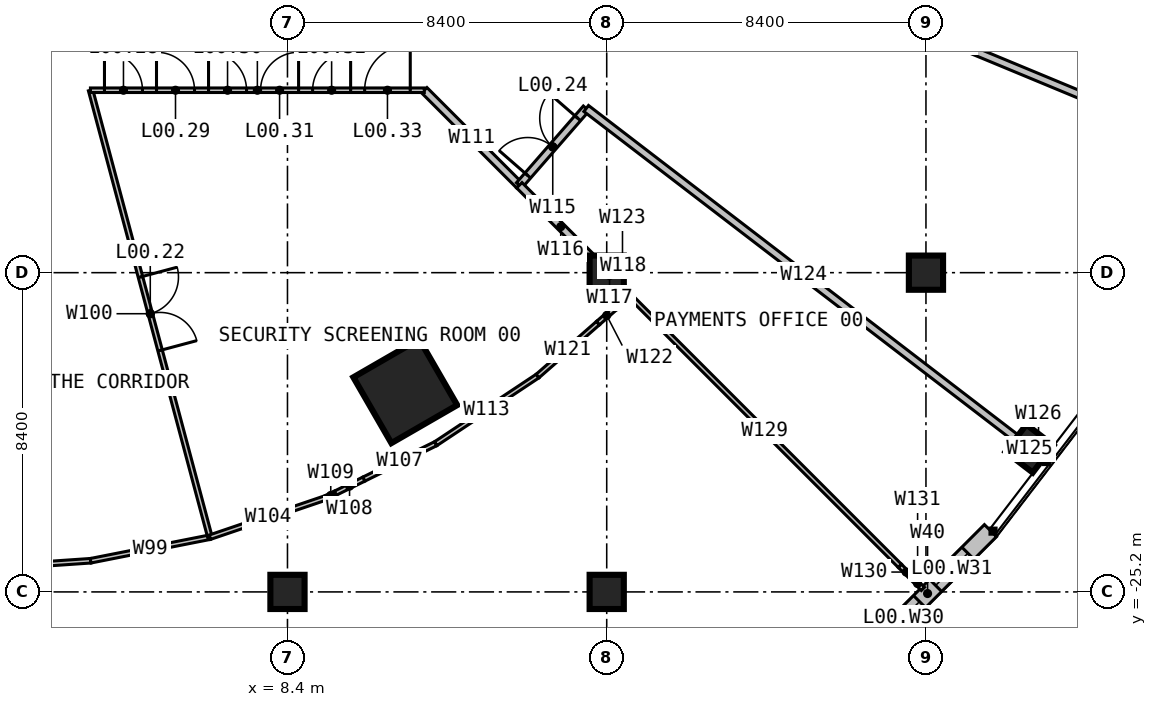
"""IFC4 building model, lengths in metres.
Left out: names, types, materials, properties, quantities, classifications, styles, units other than length and angle.
Written with IfcOpenShell. Run it as: python <this file> out.ifc"""

import sys

from ifc_helpers import new_model, si_unit, direction, frame, frame_2d, origin, origin_2d, place, context, subcontext, project, spatial, rectangle, hollow_rectangle, extrude, element, fill, save


model = new_model("IFC4")
c1 = context("Model", 3, precision=1e-05, world=origin(), true_north=direction((0.0, 1.0)))
c2 = subcontext(c1, "Body", "Model", "MODEL_VIEW")
j1 = project(units=[si_unit("LENGTHUNIT", "METRE"), si_unit("PLANEANGLEUNIT", "RADIAN")], contexts=[c1])
p1 = place(None, origin())
s1 = spatial("IfcSite", under=j1, at=p1, CompositionType="ELEMENT")
p2 = place(p1, origin())
s2 = spatial("IfcBuilding", under=s1, at=p2, CompositionType="ELEMENT")
p3 = place(p2, origin())
s3 = spatial("IfcBuildingStorey", under=s2, at=p3, CompositionType="ELEMENT", Elevation=0.0)
for number, where, z_axis, x_axis in (
    (1, (8.4, -25.2, 0.0), (0.0, 0.0, 1.0), (1.0, 0.0, 0.0)),
    (2, (16.8, -25.2, 0.0), (0.0, 0.0, 1.0), (1.0, 0.0, 0.0)),
    (3, (16.8, -16.8, 0.0), (0.0, 0.0, 1.0), (1.0, 0.0, 0.0)),
    (4, (25.2, -16.8, 0.0), (0.0, 0.0, 1.0), (1.0, 0.0, 0.0)),
    (5, (27.926, -21.428, 0.0), (0.0, 0.0, 1.0), (0.793, -0.609, 0.0)),
):
    element("IfcColumn", number, at=place(p3, frame(where, z_axis=z_axis, x_axis=x_axis)), inside=s3, PredefinedType="COLUMN", context=c2, shape_type="SweptSolid", body=[
        extrude(rectangle(XDim=0.9, YDim=0.9, at=origin_2d()), origin(), (0.0, 0.0, 1.0), 6.0),
    ])
p4 = place(p3, frame((11.5, -19.919, 0.0), z_axis=(0.0, 0.0, 1.0), x_axis=(0.5, -0.866025403784, 0.0)))
e6 = element("IfcColumn", 6, at=p4, inside=s3, PredefinedType="COLUMN", context=c2, shape_type="SweptSolid", body=[
    extrude(hollow_rectangle(XDim=2.0, YDim=2.0, WallThickness=0.24, at=origin_2d()), origin(), (0.0, 0.0, 1.0), 6.0),
])
p5 = place(p3, frame((23.588, -26.897, 0.0), z_axis=(0.0, 0.0, 1.0), x_axis=(0.707106781187, 0.707106781187, 0.0)))
e7 = element("IfcWall", 7, at=p5, inside=s3, PredefinedType="SOLIDWALL", context=c2, shape_type="SweptSolid", body=[
    extrude(rectangle(XDim=4.679, YDim=0.45, at=frame_2d((2.34, 0.0))), origin(), (0.0, 0.0, 1.0), 5.7),
])
p6 = place(p5, frame((0.84, 0.0, 0.9)))
e8 = element("IfcOpeningElement", 8, at=p6, cuts=e7, PredefinedType="OPENING", context=c2, shape_type="SweptSolid", body=[
    extrude(rectangle(XDim=1.2, YDim=3.6, at=frame_2d((0.6, 1.8))), frame((0.0, 0.235, 0.0), z_axis=(0.0, -1.0, 0.0), x_axis=(1.0, 0.0, 0.0)), (0.0, 0.0, 1.0), 0.47),
])
p7 = place(p5, frame((2.64, 0.0, 0.9)))
e9 = element("IfcOpeningElement", 9, at=p7, cuts=e7, PredefinedType="OPENING", context=c2, shape_type="SweptSolid", body=[
    extrude(rectangle(XDim=1.2, YDim=3.6, at=frame_2d((0.6, 1.8))), frame((0.0, 0.235, 0.0), z_axis=(0.0, -1.0, 0.0), x_axis=(1.0, 0.0, 0.0)), (0.0, 0.0, 1.0), 0.47),
])
p8 = place(p3, frame((0.166, -24.589, 0.0), z_axis=(0.0, 0.0, 1.0), x_axis=(0.997672608774, 0.068186257434, 0.0)))
e10 = element("IfcWall", 10, at=p8, inside=s3, PredefinedType="PARTITIONING", context=c2, shape_type="SweptSolid", body=[
    extrude(rectangle(XDim=3.061, YDim=0.12, at=frame_2d((1.531, 0.0))), origin(), (0.0, 0.0, 1.0), 5.7),
])
p9 = place(p3, frame((3.22, -24.38, 0.0), z_axis=(0.0, 0.0, 1.0), x_axis=(0.98106754531, 0.193665876033, 0.0)))
e11 = element("IfcWall", 11, at=p9, inside=s3, PredefinedType="PARTITIONING", context=c2, shape_type="SweptSolid", body=[
    extrude(rectangle(XDim=3.201, YDim=0.12, at=frame_2d((1.6, 0.0))), origin(), (0.0, 0.0, 1.0), 5.7),
])
p10 = place(p3, frame((3.22, -12.0, 0.0), z_axis=(0.0, 0.0, 1.0), x_axis=(0.257979728484, -0.966150329758, 0.0)))
e12 = element("IfcWall", 12, at=p10, inside=s3, PredefinedType="PARTITIONING", context=c2, shape_type="SweptSolid", body=[
    extrude(rectangle(XDim=12.172, YDim=0.12, at=frame_2d((6.086, 0.0))), origin(), (0.0, 0.0, 1.0), 5.7),
])
p11 = place(p10, frame((5.086, 0.0, 0.0)))
e13 = element("IfcOpeningElement", 13, at=p11, cuts=e12, PredefinedType="OPENING", context=c2, shape_type="SweptSolid", body=[
    extrude(rectangle(XDim=2.0, YDim=2.4, at=frame_2d((1.0, 1.2))), frame((0.0, 0.07, 0.0), z_axis=(0.0, -1.0, 0.0), x_axis=(1.0, 0.0, 0.0)), (0.0, 0.0, 1.0), 0.14),
])
p12 = place(p3, frame((6.36, -23.76, 0.0), z_axis=(0.0, 0.0, 1.0), x_axis=(0.946800830057, 0.321820117773, 0.0)))
e14 = element("IfcWall", 14, at=p12, inside=s3, PredefinedType="PARTITIONING", context=c2, shape_type="SweptSolid", body=[
    extrude(rectangle(XDim=3.232, YDim=0.12, at=frame_2d((1.616, 0.0))), origin(), (0.0, 0.0, 1.0), 5.7),
])
p13 = place(p3, frame((10.408, -22.233, 0.0), z_axis=(0.0, 0.0, 1.0), x_axis=(0.896913641042, 0.442205744551, 0.0)))
e15 = element("IfcWall", 15, at=p13, inside=s3, PredefinedType="PARTITIONING", context=c2, shape_type="SweptSolid", body=[
    extrude(rectangle(XDim=2.109, YDim=0.12, at=frame_2d((1.055, 0.0))), origin(), (0.0, 0.0, 1.0), 5.7),
])
p14 = place(p3, frame((9.658, -22.603, 0.0), z_axis=(0.0, 0.0, 1.0), x_axis=(0.896921584296, 0.442189633103, 0.0)))
e16 = element("IfcWall", 16, at=p14, inside=s3, PredefinedType="PARTITIONING", context=c2, shape_type="SweptSolid", body=[
    extrude(rectangle(XDim=0.837, YDim=0.12, at=frame_2d((0.418, 0.0))), origin(), (0.0, 0.0, 1.0), 5.3),
])
p15 = place(p3, frame((9.42, -22.72, 0.0), z_axis=(0.0, 0.0, 1.0), x_axis=(0.896990941369, 0.442048923878, 0.0)))
e17 = element("IfcWall", 17, at=p15, inside=s3, PredefinedType="PARTITIONING", context=c2, shape_type="SweptSolid", body=[
    extrude(rectangle(XDim=0.265, YDim=0.12, at=frame_2d((0.133, 0.0))), origin(), (0.0, 0.0, 1.0), 5.7),
])
p16 = place(p3, frame((12.0, -12.0, 0.0), z_axis=(0.0, 0.0, 1.0), x_axis=(0.707106781187, -0.707106781187, 0.0)))
e18 = element("IfcWall", 18, at=p16, inside=s3, PredefinedType="PARTITIONING", context=c2, shape_type="SweptSolid", body=[
    extrude(rectangle(XDim=3.536, YDim=0.2, at=frame_2d((1.768, 0.0))), origin(), (0.0, 0.0, 1.0), 5.7),
])
p17 = place(p3, frame((12.3, -21.3, 0.0), z_axis=(0.0, 0.0, 1.0), x_axis=(0.832994734858, 0.553280915719, 0.0)))
e19 = element("IfcWall", 19, at=p17, inside=s3, PredefinedType="PARTITIONING", context=c2, shape_type="SweptSolid", body=[
    extrude(rectangle(XDim=3.217, YDim=0.12, at=frame_2d((1.609, 0.0))), origin(), (0.0, 0.0, 1.0), 5.7),
])
p18 = place(p3, frame((14.5, -14.5, 0.0), z_axis=(0.0, 0.0, 1.0), x_axis=(0.656916126811, 0.753963661151, 0.0)))
e20 = element("IfcWall", 20, at=p18, inside=s3, PredefinedType="PARTITIONING", context=c2, shape_type="SweptSolid", body=[
    extrude(rectangle(XDim=2.679, YDim=0.2, at=frame_2d((1.34, 0.0))), origin(), (0.0, 0.0, 1.0), 5.7),
])
p19 = place(p18, frame((0.34, 0.0, 0.0)))
e21 = element("IfcOpeningElement", 21, at=p19, cuts=e20, PredefinedType="OPENING", context=c2, shape_type="SweptSolid", body=[
    extrude(rectangle(XDim=2.0, YDim=2.4, at=frame_2d((1.0, 1.2))), frame((0.0, 0.11, 0.0), z_axis=(0.0, -1.0, 0.0), x_axis=(1.0, 0.0, 0.0)), (0.0, 0.0, 1.0), 0.22),
])
p20 = place(p3, frame((14.5, -14.5, 0.0), z_axis=(0.0, 0.0, 1.0), x_axis=(0.707106781187, -0.707106781187, 0.0)))
e22 = element("IfcWall", 22, at=p20, inside=s3, PredefinedType="PARTITIONING", context=c2, shape_type="SweptSolid", body=[
    extrude(rectangle(XDim=3.083, YDim=0.2, at=frame_2d((1.542, 0.0))), origin(), (0.0, 0.0, 1.0), 5.7),
])
p21 = place(p3, frame((16.68, -16.68, 0.0), z_axis=(0.0, 0.0, 1.0), x_axis=(0.707106781187, -0.707106781187, 0.0)))
e23 = element("IfcWall", 23, at=p21, inside=s3, PredefinedType="PARTITIONING", context=c2, shape_type="SweptSolid", body=[
    extrude(rectangle(XDim=0.552, YDim=0.2, at=frame_2d((0.276, 0.0))), origin(), (0.0, 0.0, 1.0), 5.3),
])
p22 = place(p3, frame((17.07, -17.07, 0.0), z_axis=(0.0, 0.0, 1.0), x_axis=(0.707106781187, -0.707106781187, 0.0)))
e24 = element("IfcWall", 24, at=p22, inside=s3, PredefinedType="PARTITIONING", context=c2, shape_type="SweptSolid", body=[
    extrude(rectangle(XDim=0.467, YDim=0.2, at=frame_2d((0.233, 0.0))), origin(), (0.0, 0.0, 1.0), 5.7),
])
p23 = place(p3, frame((14.98, -19.52, 0.0), z_axis=(0.0, 0.0, 1.0), x_axis=(0.752226011438, 0.658905173538, 0.0)))
e25 = element("IfcWall", 25, at=p23, inside=s3, PredefinedType="PARTITIONING", context=c2, shape_type="SweptSolid", body=[
    extrude(rectangle(XDim=2.114, YDim=0.12, at=frame_2d((1.057, 0.0))), origin(), (0.0, 0.0, 1.0), 5.7),
])
p24 = place(p3, frame((16.57, -18.127, 0.0), z_axis=(0.0, 0.0, 1.0), x_axis=(0.752081905539, 0.65906965289, 0.0)))
e26 = element("IfcWall", 26, at=p24, inside=s3, PredefinedType="PARTITIONING", context=c2, shape_type="SweptSolid", body=[
    extrude(rectangle(XDim=0.612, YDim=0.12, at=frame_2d((0.306, 0.0))), origin(), (0.0, 0.0, 1.0), 5.3),
])
p25 = place(p3, frame((17.03, -17.724, 0.0), z_axis=(0.0, 0.0, 1.0), x_axis=(0.751992181934, 0.659172024824, 0.0)))
e27 = element("IfcWall", 27, at=p25, inside=s3, PredefinedType="PARTITIONING", context=c2, shape_type="SweptSolid", body=[
    extrude(rectangle(XDim=0.492, YDim=0.12, at=frame_2d((0.246, 0.0))), origin(), (0.0, 0.0, 1.0), 5.7),
])
p26 = place(p3, frame((16.26, -12.48, 0.0), z_axis=(0.0, 0.0, 1.0), x_axis=(0.79355952344, -0.608492631637, 0.0)))
e28 = element("IfcWall", 28, at=p26, inside=s3, PredefinedType="PARTITIONING", context=c2, shape_type="SweptSolid", body=[
    extrude(rectangle(XDim=14.431, YDim=0.2, at=frame_2d((7.215, 0.0))), origin(), (0.0, 0.0, 1.0), 5.7),
])
p27 = place(p3, frame((27.712, -21.261, 0.0), z_axis=(0.0, 0.0, 1.0), x_axis=(0.793772252569, -0.608215102618, 0.0)))
e29 = element("IfcWall", 29, at=p27, inside=s3, PredefinedType="PARTITIONING", context=c2, shape_type="SweptSolid", body=[
    extrude(rectangle(XDim=0.545, YDim=0.2, at=frame_2d((0.272, 0.0))), origin(), (0.0, 0.0, 1.0), 5.3),
])
p28 = place(p3, frame((28.144, -21.592, 0.0), z_axis=(0.0, 0.0, 1.0), x_axis=(0.790219801195, -0.612823519294, 0.0)))
e30 = element("IfcWall", 30, at=p28, inside=s3, PredefinedType="PARTITIONING", context=c2, shape_type="SweptSolid", body=[
    extrude(rectangle(XDim=0.045, YDim=0.2, at=frame_2d((0.023, 0.0))), origin(), (0.0, 0.0, 1.0), 5.7),
])
p29 = place(p3, frame((17.4, -17.4, 0.0), z_axis=(0.0, 0.0, 1.0), x_axis=(0.707106781187, -0.707106781187, 0.0)))
e31 = element("IfcWall", 31, at=p29, inside=s3, PredefinedType="PARTITIONING", context=c2, shape_type="SweptSolid", body=[
    extrude(rectangle(XDim=10.062, YDim=0.12, at=frame_2d((5.031, 0.0))), origin(), (0.0, 0.0, 1.0), 5.7),
])
p30 = place(p3, frame((24.515, -24.515, 0.0), z_axis=(0.0, 0.0, 1.0), x_axis=(0.707106781187, -0.707106781187, 0.0)))
e32 = element("IfcWall", 32, at=p30, inside=s3, PredefinedType="PARTITIONING", context=c2, shape_type="SweptSolid", body=[
    extrude(rectangle(XDim=0.46, YDim=0.12, at=frame_2d((0.23, 0.0))), origin(), (0.0, 0.0, 1.0), 5.3),
])
p31 = place(p3, frame((24.84, -24.84, 0.0), z_axis=(0.0, 0.0, 1.0), x_axis=(0.707106781187, -0.707106781187, 0.0)))
e33 = element("IfcWall", 33, at=p31, inside=s3, PredefinedType="PARTITIONING", context=c2, shape_type="SweptSolid", body=[
    extrude(rectangle(XDim=0.396, YDim=0.12, at=frame_2d((0.198, 0.0))), origin(), (0.0, 0.0, 1.0), 5.7),
])
p32 = place(p3, frame((18.94, -7.84, 0.0), z_axis=(0.0, 0.0, 1.0), x_axis=(0.923628236009, -0.383289553272, 0.0)))
e34 = element("IfcWall", 34, at=p32, inside=s3, PredefinedType="PARTITIONING", context=c2, shape_type="SweptSolid", body=[
    extrude(rectangle(XDim=15.028, YDim=0.2, at=frame_2d((7.514, 0.0))), origin(), (0.0, 0.0, 1.0), 5.7),
])
p33 = place(p3, frame((3.215, -12.0, 0.0), z_axis=(0.0, 0.0, 1.0), x_axis=(1.0, 0.0, 0.0)))
e35 = element("IfcWall", 35, at=p33, inside=s3, PredefinedType="PARTITIONING", context=c2, shape_type="SweptSolid", body=[
    extrude(rectangle(XDim=8.785, YDim=0.12, at=frame_2d((4.392, 0.0))), origin(), (0.0, 0.0, 1.0), 5.7),
])
p34 = place(p33, frame((0.369, 0.0, 0.0)))
e36 = element("IfcOpeningElement", 36, at=p34, cuts=e35, PredefinedType="OPENING", context=c2, shape_type="SweptSolid", body=[
    extrude(rectangle(XDim=1.0, YDim=2.2, at=frame_2d((0.5, 1.1))), frame((0.0, 0.07, 0.0), z_axis=(0.0, -1.0, 0.0), x_axis=(1.0, 0.0, 0.0)), (0.0, 0.0, 1.0), 0.14),
])
p35 = place(p33, frame((1.739, 0.0, 0.0)))
e37 = element("IfcOpeningElement", 37, at=p35, cuts=e35, PredefinedType="OPENING", context=c2, shape_type="SweptSolid", body=[
    extrude(rectangle(XDim=1.0, YDim=2.2, at=frame_2d((0.5, 1.1))), frame((0.0, 0.07, 0.0), z_axis=(0.0, -1.0, 0.0), x_axis=(1.0, 0.0, 0.0)), (0.0, 0.0, 1.0), 0.14),
])
p36 = place(p33, frame((3.108, 0.0, 0.0)))
e38 = element("IfcOpeningElement", 38, at=p36, cuts=e35, PredefinedType="OPENING", context=c2, shape_type="SweptSolid", body=[
    extrude(rectangle(XDim=1.0, YDim=2.2, at=frame_2d((0.5, 1.1))), frame((0.0, 0.07, 0.0), z_axis=(0.0, -1.0, 0.0), x_axis=(1.0, 0.0, 0.0)), (0.0, 0.0, 1.0), 0.14),
])
p37 = place(p33, frame((4.477, 0.0, 0.0)))
e39 = element("IfcOpeningElement", 39, at=p37, cuts=e35, PredefinedType="OPENING", context=c2, shape_type="SweptSolid", body=[
    extrude(rectangle(XDim=1.0, YDim=2.2, at=frame_2d((0.5, 1.1))), frame((0.0, 0.07, 0.0), z_axis=(0.0, -1.0, 0.0), x_axis=(1.0, 0.0, 0.0)), (0.0, 0.0, 1.0), 0.14),
])
p38 = place(p33, frame((5.846, 0.0, 0.0)))
e40 = element("IfcOpeningElement", 40, at=p38, cuts=e35, PredefinedType="OPENING", context=c2, shape_type="SweptSolid", body=[
    extrude(rectangle(XDim=1.0, YDim=2.2, at=frame_2d((0.5, 1.1))), frame((0.0, 0.07, 0.0), z_axis=(0.0, -1.0, 0.0), x_axis=(1.0, 0.0, 0.0)), (0.0, 0.0, 1.0), 0.14),
])
p39 = place(p33, frame((7.215, 0.0, 0.0)))
e41 = element("IfcOpeningElement", 41, at=p39, cuts=e35, PredefinedType="OPENING", context=c2, shape_type="SweptSolid", body=[
    extrude(rectangle(XDim=1.2, YDim=2.2, at=frame_2d((0.6, 1.1))), frame((0.0, 0.07, 0.0), z_axis=(0.0, -1.0, 0.0), x_axis=(1.0, 0.0, 0.0)), (0.0, 0.0, 1.0), 0.14),
])
p40 = place(p6, origin())
e42 = element("IfcWindow", 42, at=p40, inside=s3, PartitioningType="SINGLE_PANEL", PredefinedType="WINDOW", context=c2, shape_type="SweptSolid", body=[
    extrude(rectangle(XDim=1.2, YDim=3.6, at=frame_2d((0.6, 1.8))), frame((0.0, 0.03, 0.0), z_axis=(0.0, -1.0, 0.0), x_axis=(1.0, 0.0, 0.0)), (0.0, 0.0, 1.0), 0.06),
])
fill(e8, e42)
p41 = place(p7, origin())
e43 = element("IfcWindow", 43, at=p41, inside=s3, PartitioningType="SINGLE_PANEL", PredefinedType="WINDOW", context=c2, shape_type="SweptSolid", body=[
    extrude(rectangle(XDim=1.2, YDim=3.6, at=frame_2d((0.6, 1.8))), frame((0.0, 0.03, 0.0), z_axis=(0.0, -1.0, 0.0), x_axis=(1.0, 0.0, 0.0)), (0.0, 0.0, 1.0), 0.06),
])
fill(e9, e43)
p42 = place(p11, origin())
e44 = element("IfcDoor", 44, at=p42, inside=s3, OperationType="DOUBLE_DOOR_SINGLE_SWING", PredefinedType="DOOR", context=c2, shape_type="SweptSolid", body=[
    extrude(rectangle(XDim=2.0, YDim=2.4, at=frame_2d((1.0, 1.2))), frame((0.0, 0.025, 0.0), z_axis=(0.0, -1.0, 0.0), x_axis=(1.0, 0.0, 0.0)), (0.0, 0.0, 1.0), 0.05),
])
fill(e13, e44)
p43 = place(p19, origin())
e45 = element("IfcDoor", 45, at=p43, inside=s3, OperationType="DOUBLE_DOOR_SINGLE_SWING", PredefinedType="DOOR", context=c2, shape_type="SweptSolid", body=[
    extrude(rectangle(XDim=2.0, YDim=2.4, at=frame_2d((1.0, 1.2))), frame((0.0, 0.025, 0.0), z_axis=(0.0, -1.0, 0.0), x_axis=(1.0, 0.0, 0.0)), (0.0, 0.0, 1.0), 0.05),
])
fill(e21, e45)
p44 = place(p34, origin())
e46 = element("IfcDoor", 46, at=p44, inside=s3, OperationType="SINGLE_SWING_LEFT", PredefinedType="GATE", context=c2, shape_type="SweptSolid", body=[
    extrude(rectangle(XDim=1.0, YDim=2.2, at=frame_2d((0.5, 1.1))), frame((0.0, 0.025, 0.0), z_axis=(0.0, -1.0, 0.0), x_axis=(1.0, 0.0, 0.0)), (0.0, 0.0, 1.0), 0.05),
])
fill(e36, e46)
p45 = place(p35, origin())
e47 = element("IfcDoor", 47, at=p45, inside=s3, OperationType="SINGLE_SWING_LEFT", PredefinedType="GATE", context=c2, shape_type="SweptSolid", body=[
    extrude(rectangle(XDim=1.0, YDim=2.2, at=frame_2d((0.5, 1.1))), frame((0.0, 0.025, 0.0), z_axis=(0.0, -1.0, 0.0), x_axis=(1.0, 0.0, 0.0)), (0.0, 0.0, 1.0), 0.05),
])
fill(e37, e47)
p46 = place(p36, origin())
e48 = element("IfcDoor", 48, at=p46, inside=s3, OperationType="SINGLE_SWING_LEFT", PredefinedType="GATE", context=c2, shape_type="SweptSolid", body=[
    extrude(rectangle(XDim=1.0, YDim=2.2, at=frame_2d((0.5, 1.1))), frame((0.0, 0.025, 0.0), z_axis=(0.0, -1.0, 0.0), x_axis=(1.0, 0.0, 0.0)), (0.0, 0.0, 1.0), 0.05),
])
fill(e38, e48)
p47 = place(p37, origin())
e49 = element("IfcDoor", 49, at=p47, inside=s3, OperationType="SINGLE_SWING_RIGHT", PredefinedType="GATE", context=c2, shape_type="SweptSolid", body=[
    extrude(rectangle(XDim=1.0, YDim=2.2, at=frame_2d((0.5, 1.1))), frame((0.0, 0.025, 0.0), z_axis=(0.0, -1.0, 0.0), x_axis=(1.0, 0.0, 0.0)), (0.0, 0.0, 1.0), 0.05),
])
fill(e39, e49)
p48 = place(p38, origin())
e50 = element("IfcDoor", 50, at=p48, inside=s3, OperationType="SINGLE_SWING_RIGHT", PredefinedType="GATE", context=c2, shape_type="SweptSolid", body=[
    extrude(rectangle(XDim=1.0, YDim=2.2, at=frame_2d((0.5, 1.1))), frame((0.0, 0.025, 0.0), z_axis=(0.0, -1.0, 0.0), x_axis=(1.0, 0.0, 0.0)), (0.0, 0.0, 1.0), 0.05),
])
fill(e40, e50)
p49 = place(p39, origin())
e51 = element("IfcDoor", 51, at=p49, inside=s3, OperationType="SINGLE_SWING_RIGHT", PredefinedType="GATE", context=c2, shape_type="SweptSolid", body=[
    extrude(rectangle(XDim=1.2, YDim=2.2, at=frame_2d((0.6, 1.1))), frame((0.0, 0.025, 0.0), z_axis=(0.0, -1.0, 0.0), x_axis=(1.0, 0.0, 0.0)), (0.0, 0.0, 1.0), 0.05),
])
fill(e41, e51)
save(model, sys.argv[1])
